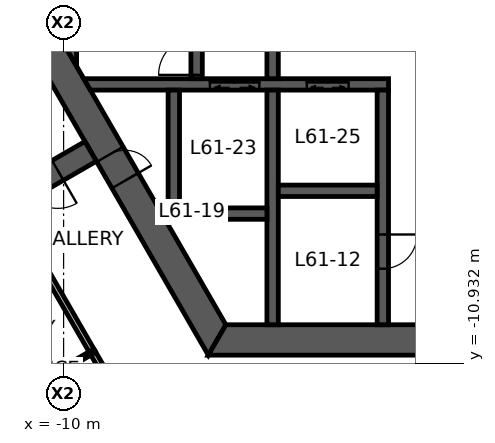
"""IFC4 building model, lengths in metres.
Left out: names, types, materials, properties, quantities, classifications, styles, units other than length and angle.
Written with IfcOpenShell. Run it as: python <this file> out.ifc"""

import sys

from ifc_helpers import new_model, si_unit, direction, frame, frame_2d, origin, place, context, subcontext, project, spatial, polyline, rectangle, outline, extrude, element, fill, save


model = new_model("IFC4")
c1 = context("Model", 3, precision=1e-05, world=origin(), true_north=direction((0.0, 1.0)))
c2 = subcontext(c1, "Body", "Model", "MODEL_VIEW")
j1 = project(units=[si_unit("LENGTHUNIT", "METRE"), si_unit("PLANEANGLEUNIT", "RADIAN")], contexts=[c1])
p1 = place(None, origin())
s1 = spatial("IfcSite", under=j1, at=p1, CompositionType="ELEMENT")
p2 = place(p1, origin())
s2 = spatial("IfcBuilding", under=s1, at=p2, CompositionType="ELEMENT")
p3 = place(p2, frame((0.0, 0.0, 244.0)))
s3 = spatial("IfcBuildingStorey", under=s2, at=p3, CompositionType="ELEMENT", Elevation=244.0)
p4 = place(p3, frame((-11.922, 0.0, 0.0), z_axis=(0.0, 0.0, 1.0), x_axis=(0.500004296715, -0.866022923061, 0.0)))
e1 = element("IfcWall", 1, at=p4, inside=s3, PredefinedType="SHEAR", context=c2, shape_type="SweptSolid", body=[
    extrude(outline(polyline([(-0.231, -0.4), (6.281, -0.4), (7.081, -0.4), (12.153, -0.4), (11.691, 0.4), (7.081, 0.4), (6.281, 0.4), (0.231, 0.4), (-0.231, -0.4)])), origin(), (0.0, 0.0, 1.0), 3.9),
])
p5 = place(p4, frame((6.281, 0.0, 0.0)))
e2 = element("IfcOpeningElement", 2, at=p5, cuts=e1, PredefinedType="OPENING", context=c2, shape_type="SweptSolid", body=[
    extrude(rectangle(XDim=0.8, YDim=2.1, at=frame_2d((0.4, 1.05))), frame((0.0, 0.41, 0.0), z_axis=(0.0, -1.0, 0.0), x_axis=(1.0, 0.0, 0.0)), (0.0, 0.0, 1.0), 0.82),
])
p6 = place(p3, frame((-5.961, -10.325, 0.0), z_axis=(0.0, 0.0, 1.0), x_axis=(1.0, 0.0, 0.0)))
e3 = element("IfcWall", 3, at=p6, inside=s3, PredefinedType="SHEAR", context=c2, shape_type="SweptSolid", body=[
    extrude(outline(polyline([(-0.231, -0.4), (5.461, -0.4), (6.461, -0.4), (12.153, -0.4), (11.691, 0.4), (6.461, 0.4), (5.461, 0.4), (0.231, 0.4), (-0.231, -0.4)])), origin(), (0.0, 0.0, 1.0), 3.9),
])
p7 = place(p6, frame((5.461, 0.0, 0.0)))
e4 = element("IfcOpeningElement", 4, at=p7, cuts=e3, PredefinedType="OPENING", context=c2, shape_type="SweptSolid", body=[
    extrude(rectangle(XDim=1.0, YDim=2.1, at=frame_2d((0.5, 1.05))), frame((0.0, 0.41, 0.0), z_axis=(0.0, -1.0, 0.0), x_axis=(1.0, 0.0, 0.0)), (0.0, 0.0, 1.0), 0.82),
])
p8 = place(p3, frame((-9.288, -5.363, 0.0), z_axis=(0.0, 0.0, 1.0), x_axis=(-0.866027473358, -0.499996415376, 0.0)))
e5 = element("IfcWall", 5, at=p8, inside=s3, PredefinedType="SHEAR", context=c2, shape_type="SweptSolid", body=[
    extrude(rectangle(XDim=7.045, YDim=0.6, at=frame_2d((3.523, 0.0))), origin(), (0.0, 0.0, 1.0), 3.9),
])
p9 = place(p8, frame((1.0, 0.0, 0.0)))
e6 = element("IfcOpeningElement", 6, at=p9, cuts=e5, PredefinedType="OPENING", context=c2, shape_type="SweptSolid", body=[
    extrude(rectangle(XDim=1.0, YDim=2.1, at=frame_2d((0.5, 1.05))), frame((0.0, 0.31, 0.0), z_axis=(0.0, -1.0, 0.0), x_axis=(1.0, 0.0, 0.0)), (0.0, 0.0, 1.0), 0.62),
])
p10 = place(p3, frame((-9.382, -3.6, 0.0), z_axis=(0.0, 0.0, 1.0), x_axis=(1.0, 0.0, 0.0)))
e7 = element("IfcWall", 7, at=p10, inside=s3, PredefinedType="SHEAR", context=c2, shape_type="SweptSolid", body=[
    extrude(outline(polyline([(0.087, -0.15), (3.232, -0.15), (4.532, -0.15), (5.782, -0.15), (6.882, -0.15), (7.932, -0.15), (7.932, 0.15), (6.882, 0.15), (5.782, 0.15), (4.532, 0.15), (3.232, 0.15), (-0.087, 0.15), (0.087, -0.15)])), origin(), (0.0, 0.0, 1.0), 3.9),
])
p11 = place(p10, frame((5.782, 0.0, 0.0)))
e8 = element("IfcOpeningElement", 8, at=p11, cuts=e7, PredefinedType="OPENING", context=c2, shape_type="SweptSolid", body=[
    extrude(rectangle(XDim=1.1, YDim=2.1, at=frame_2d((0.55, 1.05))), frame((0.0, 0.16, 0.0), z_axis=(0.0, -1.0, 0.0), x_axis=(1.0, 0.0, 0.0)), (0.0, 0.0, 1.0), 0.32),
])
p12 = place(p10, frame((3.232, 0.0, 0.0)))
e9 = element("IfcOpeningElement", 9, at=p12, cuts=e7, PredefinedType="OPENING", context=c2, shape_type="SweptSolid", body=[
    extrude(rectangle(XDim=1.3, YDim=2.1, at=frame_2d((0.65, 1.05))), frame((0.0, 0.16, 0.0), z_axis=(0.0, -1.0, 0.0), x_axis=(1.0, 0.0, 0.0)), (0.0, 0.0, 1.0), 0.32),
])
p13 = place(p3, frame((-1.6, -3.75, 0.0), z_axis=(0.0, 0.0, 1.0), x_axis=(0.0, -1.0, 0.0)))
e10 = element("IfcWall", 10, at=p13, inside=s3, PredefinedType="SHEAR", context=c2, shape_type="SweptSolid", body=[
    extrude(rectangle(XDim=6.175, YDim=0.3, at=frame_2d((3.087, 0.0))), origin(), (0.0, 0.0, 1.0), 3.9),
])
p14 = place(p13, frame((3.8, 0.0, 0.0)))
e11 = element("IfcOpeningElement", 11, at=p14, cuts=e10, PredefinedType="OPENING", context=c2, shape_type="SweptSolid", body=[
    extrude(rectangle(XDim=0.9, YDim=2.1, at=frame_2d((0.45, 1.05))), frame((0.0, 0.16, 0.0), z_axis=(0.0, -1.0, 0.0), x_axis=(1.0, 0.0, 0.0)), (0.0, 0.0, 1.0), 0.32),
])
p15 = place(p3, frame((-4.5, -3.45, 0.0), z_axis=(0.0, 0.0, 1.0), x_axis=(0.0, 1.0, 0.0)))
e12 = element("IfcWall", 12, at=p15, inside=s3, PredefinedType="SHEAR", context=c2, shape_type="SweptSolid", body=[
    extrude(rectangle(XDim=6.9, YDim=0.3, at=frame_2d((3.45, 0.0))), origin(), (0.0, 0.0, 1.0), 3.9),
])
p16 = place(p15, frame((2.95, 0.0, 0.0)))
e13 = element("IfcOpeningElement", 13, at=p16, cuts=e12, PredefinedType="OPENING", context=c2, shape_type="SweptSolid", body=[
    extrude(rectangle(XDim=1.0, YDim=2.1, at=frame_2d((0.5, 1.05))), frame((0.0, 0.16, 0.0), z_axis=(0.0, -1.0, 0.0), x_axis=(1.0, 0.0, 0.0)), (0.0, 0.0, 1.0), 0.32),
])
p17 = place(p3, frame((-6.5, -3.45, 0.0), z_axis=(0.0, 0.0, 1.0), x_axis=(0.0, 1.0, 0.0)))
e14 = element("IfcWall", 14, at=p17, inside=s3, PredefinedType="SHEAR", context=c2, shape_type="SweptSolid", body=[
    extrude(rectangle(XDim=6.9, YDim=0.3, at=frame_2d((3.45, 0.0))), origin(), (0.0, 0.0, 1.0), 3.9),
])
p18 = place(p17, frame((0.1, 0.0, 0.0)))
e15 = element("IfcOpeningElement", 15, at=p18, cuts=e14, PredefinedType="OPENING", context=c2, shape_type="SweptSolid", body=[
    extrude(rectangle(XDim=1.0, YDim=2.1, at=frame_2d((0.5, 1.05))), frame((0.0, 0.16, 0.0), z_axis=(0.0, -1.0, 0.0), x_axis=(1.0, 0.0, 0.0)), (0.0, 0.0, 1.0), 0.32),
])
p19 = place(p3, frame((-4.5, -3.75, 0.0), z_axis=(0.0, 0.0, 1.0), x_axis=(0.0, -1.0, 0.0)))
e16 = element("IfcWall", 16, at=p19, inside=s3, PredefinedType="SHEAR", context=c2, shape_type="SweptSolid", body=[
    extrude(rectangle(XDim=6.175, YDim=0.3, at=frame_2d((3.087, 0.0))), origin(), (0.0, 0.0, 1.0), 3.9),
])
for number, where, z_axis, x_axis in (
    (17, (-4.35, -6.4, 0.0), (0.0, 0.0, 1.0), (1.0, 0.0, 0.0)),
    (18, (-7.25, -7.0, 0.0), (0.0, 0.0, 1.0), (1.0, 0.0, 0.0)),
):
    element("IfcWall", number, at=place(p3, frame(where, z_axis=z_axis, x_axis=x_axis)), inside=s3, PredefinedType="SHEAR", context=c2, shape_type="SweptSolid", body=[
        extrude(rectangle(XDim=2.6, YDim=0.3, at=frame_2d((1.3, 0.0))), origin(), (0.0, 0.0, 1.0), 3.9),
    ])
p20 = place(p3, frame((-7.1, -3.75, 0.0), z_axis=(0.0, 0.0, 1.0), x_axis=(0.0, -1.0, 0.0)))
e19 = element("IfcWall", 19, at=p20, inside=s3, PredefinedType="SHEAR", context=c2, shape_type="SweptSolid", body=[
    extrude(rectangle(XDim=3.1, YDim=0.3, at=frame_2d((1.55, 0.0))), origin(), (0.0, 0.0, 1.0), 3.9),
])
p21 = place(p3, frame((-9.808, -2.862, 0.0), z_axis=(0.0, 0.0, 1.0), x_axis=(0.0, 1.0, 0.0)))
e20 = element("IfcWall", 20, at=p21, inside=s3, PredefinedType="SHEAR", context=c2, shape_type="SweptSolid", body=[
    extrude(outline(polyline([(-0.26, -0.15), (5.984, -0.15), (5.465, 0.15), (0.26, 0.15), (-0.26, -0.15)])), origin(), (0.0, 0.0, 1.0), 3.9),
])
p22 = place(p3, frame((-9.237, -10.65, 0.0), z_axis=(0.0, 0.0, 1.0), x_axis=(-0.499977562641, 0.866038357612, 0.0)))
e21 = element("IfcWall", 21, at=p22, inside=s3, PredefinedType="PARTITIONING", context=c2, shape_type="SweptSolid", body=[
    extrude(rectangle(XDim=3.01, YDim=0.15, at=frame_2d((1.505, 0.0))), origin(), (0.0, 0.0, 1.0), 2.95),
])
p23 = place(p3, frame((-7.705, -13.305, 0.0), z_axis=(0.0, 0.0, 1.0), x_axis=(-0.500024891708, 0.866011032073, 0.0)))
e22 = element("IfcWall", 22, at=p23, inside=s3, PredefinedType="PARTITIONING", context=c2, shape_type="SweptSolid", body=[
    extrude(rectangle(XDim=3.074, YDim=0.15, at=frame_2d((1.537, 0.0))), origin(), (0.0, 0.0, 1.0), 2.95),
])
p24 = place(p23, frame((1.037, 0.0, 0.0)))
e23 = element("IfcOpeningElement", 23, at=p24, cuts=e22, PredefinedType="OPENING", context=c2, shape_type="SweptSolid", body=[
    extrude(rectangle(XDim=1.0, YDim=2.1, at=frame_2d((0.5, 1.05))), frame((0.0, 0.085, 0.0), z_axis=(0.0, -1.0, 0.0), x_axis=(1.0, 0.0, 0.0)), (0.0, 0.0, 1.0), 0.17),
])
p25 = place(p3, frame((-9.242, -10.642, 0.0), z_axis=(0.0, 0.0, 1.0), x_axis=(-0.865255114713, -0.501331812737, 0.0)))
e24 = element("IfcWall", 24, at=p25, inside=s3, PredefinedType="PARTITIONING", context=c2, shape_type="SweptSolid", body=[
    extrude(rectangle(XDim=2.8, YDim=0.1, at=frame_2d((1.4, 0.0))), origin(), (0.0, 0.0, 1.0), 2.95),
])
p26 = place(p5, origin())
e25 = element("IfcDoor", 25, at=p26, inside=s3, OperationType="SINGLE_SWING_RIGHT", PredefinedType="DOOR", context=c2, shape_type="SweptSolid", body=[
    extrude(rectangle(XDim=0.8, YDim=2.1, at=frame_2d((0.4, 1.05))), frame((0.0, 0.025, 0.0), z_axis=(0.0, -1.0, 0.0), x_axis=(1.0, 0.0, 0.0)), (0.0, 0.0, 1.0), 0.05),
])
fill(e2, e25)
p27 = place(p18, origin())
e26 = element("IfcDoor", 26, at=p27, inside=s3, OperationType="SINGLE_SWING_LEFT", PredefinedType="DOOR", context=c2, shape_type="SweptSolid", body=[
    extrude(rectangle(XDim=1.0, YDim=2.1, at=frame_2d((0.5, 1.05))), frame((0.0, 0.025, 0.0), z_axis=(0.0, -1.0, 0.0), x_axis=(1.0, 0.0, 0.0)), (0.0, 0.0, 1.0), 0.05),
])
fill(e15, e26)
p28 = place(p14, origin())
e27 = element("IfcDoor", 27, at=p28, inside=s3, OperationType="SINGLE_SWING_LEFT", PredefinedType="DOOR", context=c2, shape_type="SweptSolid", body=[
    extrude(rectangle(XDim=0.9, YDim=2.1, at=frame_2d((0.45, 1.05))), frame((0.0, 0.025, 0.0), z_axis=(0.0, -1.0, 0.0), x_axis=(1.0, 0.0, 0.0)), (0.0, 0.0, 1.0), 0.05),
])
fill(e11, e27)
p29 = place(p9, origin())
e28 = element("IfcDoor", 28, at=p29, inside=s3, OperationType="SINGLE_SWING_LEFT", PredefinedType="DOOR", context=c2, shape_type="SweptSolid", body=[
    extrude(rectangle(XDim=1.0, YDim=2.1, at=frame_2d((0.5, 1.05))), frame((0.0, 0.025, 0.0), z_axis=(0.0, -1.0, 0.0), x_axis=(1.0, 0.0, 0.0)), (0.0, 0.0, 1.0), 0.05),
])
fill(e6, e28)
p30 = place(p11, origin())
e29 = element("IfcDoor", 29, at=p30, inside=s3, OperationType="DOUBLE_DOOR_SLIDING", PredefinedType="DOOR", context=c2, shape_type="SweptSolid", body=[
    extrude(rectangle(XDim=1.1, YDim=2.1, at=frame_2d((0.55, 1.05))), frame((0.0, 0.025, 0.0), z_axis=(0.0, -1.0, 0.0), x_axis=(1.0, 0.0, 0.0)), (0.0, 0.0, 1.0), 0.05),
])
fill(e8, e29)
p31 = place(p12, origin())
e30 = element("IfcDoor", 30, at=p31, inside=s3, OperationType="DOUBLE_DOOR_SLIDING", PredefinedType="DOOR", context=c2, shape_type="SweptSolid", body=[
    extrude(rectangle(XDim=1.3, YDim=2.1, at=frame_2d((0.65, 1.05))), frame((0.0, 0.025, 0.0), z_axis=(0.0, -1.0, 0.0), x_axis=(1.0, 0.0, 0.0)), (0.0, 0.0, 1.0), 0.05),
])
fill(e9, e30)
save(model, sys.argv[1])
